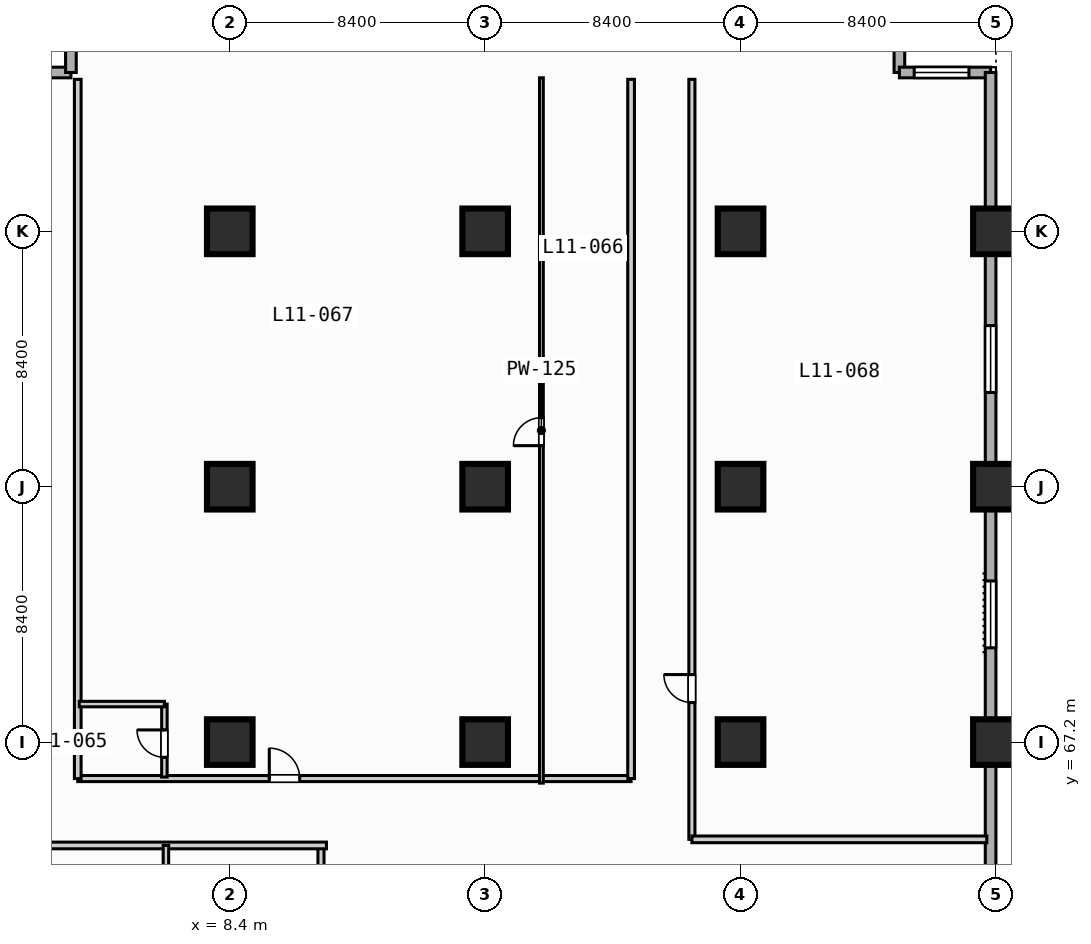
"""IFC4 building model, lengths in metres.
Left out: names, types, materials, properties, quantities, classifications, styles, units other than length and angle.
Written with IfcOpenShell. Run it as: python <this file> out.ifc"""

import sys

from ifc_helpers import new_model, si_unit, direction, frame, frame_2d, origin, origin_2d, place, context, subcontext, project, spatial, rectangle, extrude, element, fill, save


model = new_model("IFC4")
c1 = context("Model", 3, precision=1e-05, world=origin(), true_north=direction((0.0, 1.0)))
c2 = subcontext(c1, "Body", "Model", "MODEL_VIEW")
j1 = project(units=[si_unit("LENGTHUNIT", "METRE"), si_unit("PLANEANGLEUNIT", "RADIAN")], contexts=[c1])
p1 = place(None, origin())
s1 = spatial("IfcSite", under=j1, at=p1, CompositionType="ELEMENT")
p2 = place(p1, origin())
s2 = spatial("IfcBuilding", under=s1, at=p2, CompositionType="ELEMENT")
p3 = place(p2, frame((0.0, 0.0, 51.0)))
s3 = spatial("IfcBuildingStorey", under=s2, at=p3, CompositionType="ELEMENT", Elevation=51.0)
for number, where, z_axis, x_axis in (
    (1, (8.4, 67.2, 0.0), (0.0, 0.0, 1.0), (1.0, 0.0, 0.0)),
    (2, (8.4, 75.6, 0.0), (0.0, 0.0, 1.0), (1.0, 0.0, 0.0)),
    (3, (8.4, 84.0, 0.0), (0.0, 0.0, 1.0), (1.0, 0.0, 0.0)),
    (4, (16.8, 67.2, 0.0), (0.0, 0.0, 1.0), (1.0, 0.0, 0.0)),
    (5, (16.8, 75.6, 0.0), (0.0, 0.0, 1.0), (1.0, 0.0, 0.0)),
    (6, (16.8, 84.0, 0.0), (0.0, 0.0, 1.0), (1.0, 0.0, 0.0)),
    (7, (25.2, 67.2, 0.0), (0.0, 0.0, 1.0), (1.0, 0.0, 0.0)),
    (8, (25.2, 75.6, 0.0), (0.0, 0.0, 1.0), (1.0, 0.0, 0.0)),
    (9, (25.2, 84.0, 0.0), (0.0, 0.0, 1.0), (1.0, 0.0, 0.0)),
    (10, (33.6, 67.2, 0.0), (0.0, 0.0, 1.0), (1.0, 0.0, 0.0)),
    (11, (33.6, 75.6, 0.0), (0.0, 0.0, 1.0), (1.0, 0.0, 0.0)),
    (12, (33.6, 84.0, 0.0), (0.0, 0.0, 1.0), (1.0, 0.0, 0.0)),
):
    element("IfcColumn", number, at=place(p3, frame(where, z_axis=z_axis, x_axis=x_axis)), inside=s3, PredefinedType="COLUMN", context=c2, shape_type="SweptSolid", body=[
        extrude(rectangle(XDim=1.5, YDim=1.5, at=origin_2d()), origin(), (0.0, 0.0, 1.0), 3.8),
    ])
for number, where, z_axis, x_axis in (
    (13, (0.175, 89.225, 0.0), (0.0, 0.0, 1.0), (1.0, 0.0, 0.0)),
    (14, (3.175, 89.225, 0.0), (0.0, 0.0, 1.0), (0.0, 1.0, 0.0)),
    (15, (30.425, 92.225, 0.0), (0.0, 0.0, 1.0), (0.0, -1.0, 0.0)),
):
    element("IfcWall", number, at=place(p3, frame(where, z_axis=z_axis, x_axis=x_axis)), inside=s3, PredefinedType="STANDARD", context=c2, shape_type="SweptSolid", body=[
        extrude(rectangle(XDim=3.0, YDim=0.35, at=frame_2d((1.5, 0.0))), origin(), (0.0, 0.0, 1.0), 3.55),
    ])
p4 = place(p3, frame((30.425, 89.225, 0.0), z_axis=(0.0, 0.0, 1.0), x_axis=(1.0, 0.0, 0.0)))
e16 = element("IfcWall", 16, at=p4, inside=s3, PredefinedType="STANDARD", context=c2, shape_type="SweptSolid", body=[
    extrude(rectangle(XDim=3.0, YDim=0.35, at=frame_2d((1.5, 0.0))), origin(), (0.0, 0.0, 1.0), 3.55),
])
p5 = place(p4, frame((0.488, 0.0, 0.85)))
e17 = element("IfcOpeningElement", 17, at=p5, cuts=e16, PredefinedType="OPENING", context=c2, shape_type="SweptSolid", body=[
    extrude(rectangle(XDim=1.8, YDim=1.8, at=frame_2d((0.9, 0.9))), frame((0.0, 0.185, 0.0), z_axis=(0.0, -1.0, 0.0), x_axis=(1.0, 0.0, 0.0)), (0.0, 0.0, 1.0), 0.37),
])
p6 = place(p3, frame((33.425, 89.225, 0.0), z_axis=(0.0, 0.0, 1.0), x_axis=(0.0, -1.0, 0.0)))
e18 = element("IfcWall", 18, at=p6, inside=s3, PredefinedType="STANDARD", context=c2, shape_type="SweptSolid", body=[
    extrude(rectangle(XDim=55.8, YDim=0.35, at=frame_2d((27.9, 0.0))), origin(), (0.0, 0.0, 1.0), 3.55),
])
p7 = place(p6, frame((16.725, 0.0, 0.85)))
e19 = element("IfcOpeningElement", 19, at=p7, cuts=e18, PredefinedType="OPENING", context=c2, shape_type="SweptSolid", body=[
    extrude(rectangle(XDim=2.2, YDim=1.8, at=frame_2d((1.1, 0.9))), frame((0.0, 0.185, 0.0), z_axis=(0.0, -1.0, 0.0), x_axis=(1.0, 0.0, 0.0)), (0.0, 0.0, 1.0), 0.37),
])
p8 = place(p6, frame((8.325, 0.0, 0.85)))
e20 = element("IfcOpeningElement", 20, at=p8, cuts=e18, PredefinedType="OPENING", context=c2, shape_type="SweptSolid", body=[
    extrude(rectangle(XDim=2.2, YDim=1.8, at=frame_2d((1.1, 0.9))), frame((0.0, 0.185, 0.0), z_axis=(0.0, -1.0, 0.0), x_axis=(1.0, 0.0, 0.0)), (0.0, 0.0, 1.0), 0.37),
])
p9 = place(p3, frame((11.4, 3.4, 0.0), z_axis=(0.0, 0.0, 1.0), x_axis=(0.0, 1.0, 0.0)))
e21 = element("IfcWall", 21, at=p9, inside=s3, PredefinedType="PARTITIONING", context=c2, shape_type="SweptSolid", body=[
    extrude(rectangle(XDim=60.4, YDim=0.2, at=frame_2d((30.2, 0.0))), origin(), (0.0, 0.0, 1.0), 3.55),
])
p10 = place(p9, frame((6.065, 0.0, 0.0)))
e22 = element("IfcOpeningElement", 22, at=p10, cuts=e21, PredefinedType="OPENING", context=c2, shape_type="SweptSolid", body=[
    extrude(rectangle(XDim=1.0, YDim=2.15, at=frame_2d((0.5, 1.075))), frame((0.0, 0.11, 0.0), z_axis=(0.0, -1.0, 0.0), x_axis=(1.0, 0.0, 0.0)), (0.0, 0.0, 1.0), 0.22),
])
p11 = place(p9, frame((13.735, 0.0, 0.0)))
e23 = element("IfcOpeningElement", 23, at=p11, cuts=e21, PredefinedType="OPENING", context=c2, shape_type="SweptSolid", body=[
    extrude(rectangle(XDim=1.0, YDim=2.15, at=frame_2d((0.5, 1.075))), frame((0.0, 0.11, 0.0), z_axis=(0.0, -1.0, 0.0), x_axis=(1.0, 0.0, 0.0)), (0.0, 0.0, 1.0), 0.22),
])
p12 = place(p9, frame((22.96, 0.0, 0.0)))
e24 = element("IfcOpeningElement", 24, at=p12, cuts=e21, PredefinedType="OPENING", context=c2, shape_type="SweptSolid", body=[
    extrude(rectangle(XDim=1.0, YDim=2.15, at=frame_2d((0.5, 1.075))), frame((0.0, 0.11, 0.0), z_axis=(0.0, -1.0, 0.0), x_axis=(1.0, 0.0, 0.0)), (0.0, 0.0, 1.0), 0.22),
])
p13 = place(p9, frame((31.785, 0.0, 0.0)))
e25 = element("IfcOpeningElement", 25, at=p13, cuts=e21, PredefinedType="OPENING", context=c2, shape_type="SweptSolid", body=[
    extrude(rectangle(XDim=1.0, YDim=2.15, at=frame_2d((0.5, 1.075))), frame((0.0, 0.11, 0.0), z_axis=(0.0, -1.0, 0.0), x_axis=(1.0, 0.0, 0.0)), (0.0, 0.0, 1.0), 0.22),
])
p14 = place(p9, frame((42.56, 0.0, 0.0)))
e26 = element("IfcOpeningElement", 26, at=p14, cuts=e21, PredefinedType="OPENING", context=c2, shape_type="SweptSolid", body=[
    extrude(rectangle(XDim=1.0, YDim=2.15, at=frame_2d((0.5, 1.075))), frame((0.0, 0.11, 0.0), z_axis=(0.0, -1.0, 0.0), x_axis=(1.0, 0.0, 0.0)), (0.0, 0.0, 1.0), 0.22),
])
p15 = place(p9, frame((53.935, 0.0, 0.0)))
e27 = element("IfcOpeningElement", 27, at=p15, cuts=e21, PredefinedType="OPENING", context=c2, shape_type="SweptSolid", body=[
    extrude(rectangle(XDim=1.0, YDim=2.15, at=frame_2d((0.5, 1.075))), frame((0.0, 0.11, 0.0), z_axis=(0.0, -1.0, 0.0), x_axis=(1.0, 0.0, 0.0)), (0.0, 0.0, 1.0), 0.22),
])
p16 = place(p3, frame((0.2, 63.8, 0.0), z_axis=(0.0, 0.0, 1.0), x_axis=(1.0, 0.0, 0.0)))
e28 = element("IfcWall", 28, at=p16, inside=s3, PredefinedType="PARTITIONING", context=c2, shape_type="SweptSolid", body=[
    extrude(rectangle(XDim=11.38, YDim=0.22, at=frame_2d((5.69, 0.0))), origin(), (0.0, 0.0, 1.0), 3.55),
])
p17 = place(p3, frame((6.3, 61.55, 0.0), z_axis=(0.0, 0.0, 1.0), x_axis=(0.0, 1.0, 0.0)))
e29 = element("IfcWall", 29, at=p17, inside=s3, PredefinedType="PLUMBINGWALL", context=c2, shape_type="SweptSolid", body=[
    extrude(rectangle(XDim=2.25, YDim=0.18, at=frame_2d((1.125, 0.0))), origin(), (0.0, 0.0, 1.0), 3.55),
])
p18 = place(p17, frame((0.675, 0.0, 0.0)))
e30 = element("IfcOpeningElement", 30, at=p18, cuts=e29, PredefinedType="OPENING", context=c2, shape_type="SweptSolid", body=[
    extrude(rectangle(XDim=0.9, YDim=2.1, at=frame_2d((0.45, 1.05))), frame((0.0, 0.1, 0.0), z_axis=(0.0, -1.0, 0.0), x_axis=(1.0, 0.0, 0.0)), (0.0, 0.0, 1.0), 0.2),
])
p19 = place(p3, frame((3.4, 66.0, 0.0), z_axis=(0.0, 0.0, 1.0), x_axis=(1.0, 0.0, 0.0)))
e31 = element("IfcWall", 31, at=p19, inside=s3, PredefinedType="PARTITIONING", context=c2, shape_type="SweptSolid", body=[
    extrude(rectangle(XDim=18.2, YDim=0.2, at=frame_2d((9.1, 0.0))), origin(), (0.0, 0.0, 1.0), 3.55),
])
p20 = place(p19, frame((6.3, 0.0, 0.0)))
e32 = element("IfcOpeningElement", 32, at=p20, cuts=e31, PredefinedType="OPENING", context=c2, shape_type="SweptSolid", body=[
    extrude(rectangle(XDim=1.0, YDim=2.15, at=frame_2d((0.5, 1.075))), frame((0.0, 0.11, 0.0), z_axis=(0.0, -1.0, 0.0), x_axis=(1.0, 0.0, 0.0)), (0.0, 0.0, 1.0), 0.22),
])
for number, where, z_axis, x_axis in (
    (33, (21.6, 66.0, 0.0), (0.0, 0.0, 1.0), (0.0, 1.0, 0.0)),
    (34, (3.4, 66.0, 0.0), (0.0, 0.0, 1.0), (0.0, 1.0, 0.0)),
):
    element("IfcWall", number, at=place(p3, frame(where, z_axis=z_axis, x_axis=x_axis)), inside=s3, PredefinedType="PARTITIONING", context=c2, shape_type="SweptSolid", body=[
        extrude(rectangle(XDim=23.0, YDim=0.22, at=frame_2d((11.5, 0.0))), origin(), (0.0, 0.0, 1.0), 3.55),
    ])
p21 = place(p3, frame((6.25, 66.05, 0.0), z_axis=(0.0, 0.0, 1.0), x_axis=(0.0, 1.0, 0.0)))
e35 = element("IfcWall", 35, at=p21, inside=s3, PredefinedType="PLUMBINGWALL", context=c2, shape_type="SweptSolid", body=[
    extrude(rectangle(XDim=2.4, YDim=0.18, at=frame_2d((1.2, 0.0))), origin(), (0.0, 0.0, 1.0), 3.55),
])
p22 = place(p21, frame((0.65, 0.0, 0.0)))
e36 = element("IfcOpeningElement", 36, at=p22, cuts=e35, PredefinedType="OPENING", context=c2, shape_type="SweptSolid", body=[
    extrude(rectangle(XDim=0.9, YDim=2.1, at=frame_2d((0.45, 1.05))), frame((0.0, 0.1, 0.0), z_axis=(0.0, -1.0, 0.0), x_axis=(1.0, 0.0, 0.0)), (0.0, 0.0, 1.0), 0.2),
])
p23 = place(p3, frame((3.45, 68.45, 0.0), z_axis=(0.0, 0.0, 1.0), x_axis=(1.0, 0.0, 0.0)))
e37 = element("IfcWall", 37, at=p23, inside=s3, PredefinedType="PLUMBINGWALL", context=c2, shape_type="SweptSolid", body=[
    extrude(rectangle(XDim=2.8, YDim=0.18, at=frame_2d((1.4, 0.0))), origin(), (0.0, 0.0, 1.0), 3.55),
])
p24 = place(p3, frame((18.65, 65.85, 0.0), z_axis=(0.0, 0.0, 1.0), x_axis=(0.0, 1.0, 0.0)))
e38 = element("IfcWall", 38, at=p24, inside=s3, PredefinedType="PARTITIONING", context=c2, shape_type="SweptSolid", body=[
    extrude(rectangle(XDim=23.2, YDim=0.125, at=frame_2d((11.6, 0.0))), origin(), (0.0, 0.0, 1.0), 3.55),
])
p25 = place(p24, frame((11.1, 0.0, 0.0)))
e39 = element("IfcOpeningElement", 39, at=p25, cuts=e38, PredefinedType="OPENING", context=c2, shape_type="SweptSolid", body=[
    extrude(rectangle(XDim=0.92, YDim=2.1, at=frame_2d((0.46, 1.05))), frame((0.0, 0.073, 0.0), z_axis=(0.0, -1.0, 0.0), x_axis=(1.0, 0.0, 0.0)), (0.0, 0.0, 1.0), 0.145),
])
p26 = place(p3, frame((23.6, 64.0, 0.0), z_axis=(0.0, 0.0, 1.0), x_axis=(0.0, 1.0, 0.0)))
e40 = element("IfcWall", 40, at=p26, inside=s3, PredefinedType="PARTITIONING", context=c2, shape_type="SweptSolid", body=[
    extrude(rectangle(XDim=25.0, YDim=0.2, at=frame_2d((12.5, 0.0))), origin(), (0.0, 0.0, 1.0), 3.55),
])
p27 = place(p26, frame((4.5, 0.0, 0.0)))
e41 = element("IfcOpeningElement", 41, at=p27, cuts=e40, PredefinedType="OPENING", context=c2, shape_type="SweptSolid", body=[
    extrude(rectangle(XDim=0.92, YDim=2.1, at=frame_2d((0.46, 1.05))), frame((0.0, 0.11, 0.0), z_axis=(0.0, -1.0, 0.0), x_axis=(1.0, 0.0, 0.0)), (0.0, 0.0, 1.0), 0.22),
])
p28 = place(p3, frame((23.6, 64.0, 0.0), z_axis=(0.0, 0.0, 1.0), x_axis=(1.0, 0.0, 0.0)))
e42 = element("IfcWall", 42, at=p28, inside=s3, PredefinedType="PARTITIONING", context=c2, shape_type="SweptSolid", body=[
    extrude(rectangle(XDim=9.7, YDim=0.22, at=frame_2d((4.85, 0.0))), origin(), (0.0, 0.0, 1.0), 3.55),
])
p29 = place(p5, origin())
e43 = element("IfcWindow", 43, at=p29, inside=s3, PartitioningType="SINGLE_PANEL", PredefinedType="WINDOW", context=c2, shape_type="SweptSolid", body=[
    extrude(rectangle(XDim=1.8, YDim=1.8, at=frame_2d((0.9, 0.9))), frame((0.0, 0.03, 0.0), z_axis=(0.0, -1.0, 0.0), x_axis=(1.0, 0.0, 0.0)), (0.0, 0.0, 1.0), 0.06),
])
fill(e17, e43)
p30 = place(p7, origin())
e44 = element("IfcWindow", 44, at=p30, inside=s3, PartitioningType="SINGLE_PANEL", PredefinedType="WINDOW", context=c2, shape_type="SweptSolid", body=[
    extrude(rectangle(XDim=2.2, YDim=1.8, at=frame_2d((1.1, 0.9))), frame((0.0, 0.03, 0.0), z_axis=(0.0, -1.0, 0.0), x_axis=(1.0, 0.0, 0.0)), (0.0, 0.0, 1.0), 0.06),
])
fill(e19, e44)
p31 = place(p8, origin())
e45 = element("IfcWindow", 45, at=p31, inside=s3, PartitioningType="SINGLE_PANEL", PredefinedType="WINDOW", context=c2, shape_type="SweptSolid", body=[
    extrude(rectangle(XDim=2.2, YDim=1.8, at=frame_2d((1.1, 0.9))), frame((0.0, 0.03, 0.0), z_axis=(0.0, -1.0, 0.0), x_axis=(1.0, 0.0, 0.0)), (0.0, 0.0, 1.0), 0.06),
])
fill(e20, e45)
p32 = place(p20, origin())
e46 = element("IfcDoor", 46, at=p32, inside=s3, OperationType="SINGLE_SWING_LEFT", PredefinedType="DOOR", context=c2, shape_type="SweptSolid", body=[
    extrude(rectangle(XDim=1.0, YDim=2.15, at=frame_2d((0.5, 1.075))), frame((0.0, 0.025, 0.0), z_axis=(0.0, -1.0, 0.0), x_axis=(1.0, 0.0, 0.0)), (0.0, 0.0, 1.0), 0.05),
])
fill(e32, e46)
p33 = place(p22, origin())
e47 = element("IfcDoor", 47, at=p33, inside=s3, OperationType="SINGLE_SWING_RIGHT", PredefinedType="DOOR", context=c2, shape_type="SweptSolid", body=[
    extrude(rectangle(XDim=0.9, YDim=2.1, at=frame_2d((0.45, 1.05))), frame((0.0, 0.025, 0.0), z_axis=(0.0, -1.0, 0.0), x_axis=(1.0, 0.0, 0.0)), (0.0, 0.0, 1.0), 0.05),
])
fill(e36, e47)
p34 = place(p25, origin())
e48 = element("IfcDoor", 48, at=p34, inside=s3, OperationType="SINGLE_SWING_LEFT", PredefinedType="DOOR", context=c2, shape_type="SweptSolid", body=[
    extrude(rectangle(XDim=0.92, YDim=2.1, at=frame_2d((0.46, 1.05))), frame((0.0, 0.025, 0.0), z_axis=(0.0, -1.0, 0.0), x_axis=(1.0, 0.0, 0.0)), (0.0, 0.0, 1.0), 0.05),
])
fill(e39, e48)
p35 = place(p27, origin())
e49 = element("IfcDoor", 49, at=p35, inside=s3, OperationType="SINGLE_SWING_RIGHT", PredefinedType="DOOR", context=c2, shape_type="SweptSolid", body=[
    extrude(rectangle(XDim=0.92, YDim=2.1, at=frame_2d((0.46, 1.05))), frame((0.0, 0.025, 0.0), z_axis=(0.0, -1.0, 0.0), x_axis=(1.0, 0.0, 0.0)), (0.0, 0.0, 1.0), 0.05),
])
fill(e41, e49)
save(model, sys.argv[1])
